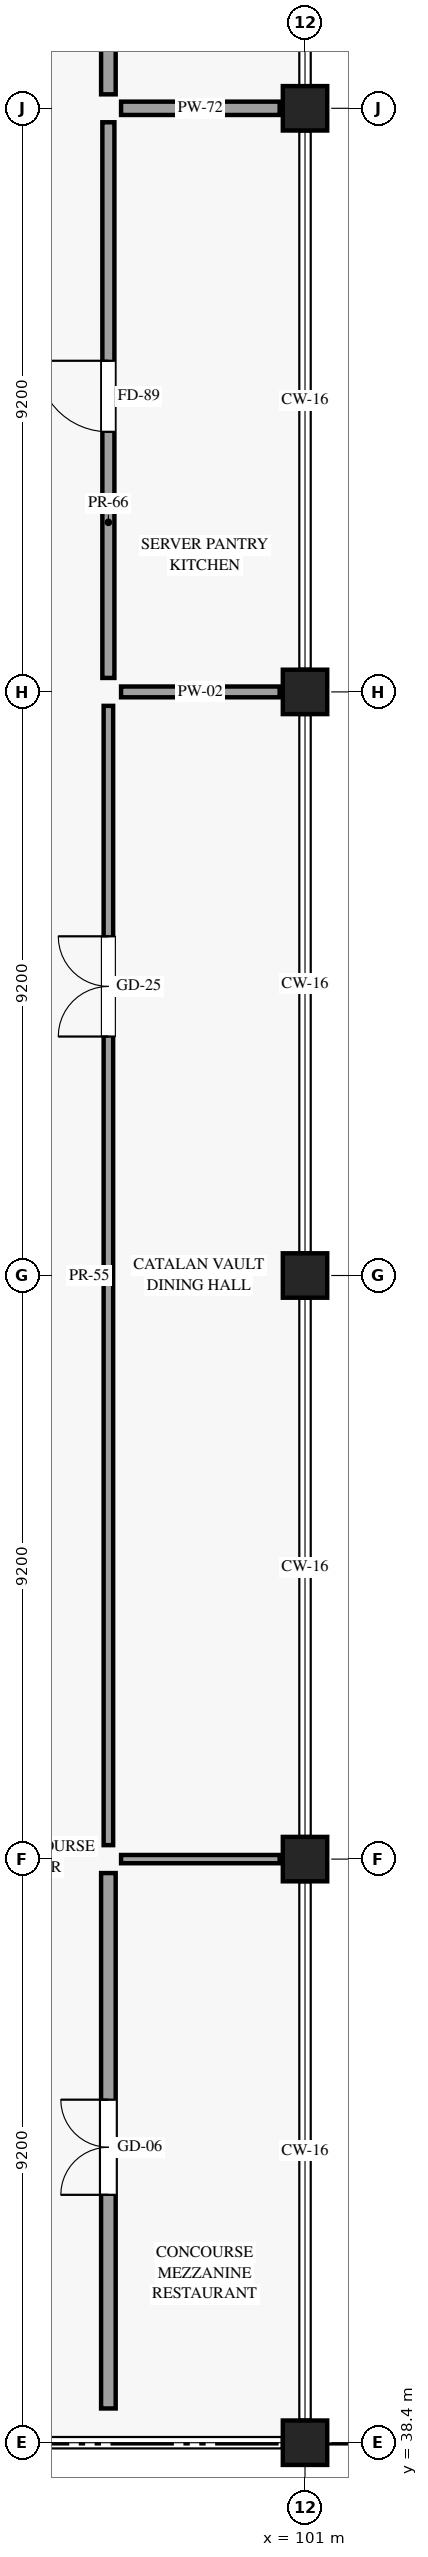
"""IFC4 building model, lengths in metres.
Left out: names, types, materials, properties, quantities, classifications, styles, units other than length and angle.
Written with IfcOpenShell. Run it as: python <this file> out.ifc"""

import sys

from ifc_helpers import new_model, si_unit, direction, frame, frame_2d, origin, origin_2d, place, context, subcontext, project, spatial, rectangle, extrude, element, fill, save


model = new_model("IFC4")
c1 = context("Model", 3, precision=1e-05, world=origin(), true_north=direction((0.0, 1.0)))
c2 = subcontext(c1, "Body", "Model", "MODEL_VIEW")
j1 = project(units=[si_unit("LENGTHUNIT", "METRE"), si_unit("PLANEANGLEUNIT", "RADIAN")], contexts=[c1])
p1 = place(None, origin())
s1 = spatial("IfcSite", under=j1, at=p1, CompositionType="ELEMENT")
p2 = place(p1, origin())
s2 = spatial("IfcBuilding", under=s1, at=p2, CompositionType="ELEMENT")
p3 = place(p2, frame((0.0, 0.0, 5.4)))
s3 = spatial("IfcBuildingStorey", under=s2, at=p3, CompositionType="ELEMENT", Elevation=5.4)
for number, where, z_axis, x_axis in (
    (1, (101.0, 38.4, 0.0), (0.0, 0.0, 1.0), (1.0, 0.0, 0.0)),
    (2, (101.0, 47.6, 0.0), (0.0, 0.0, 1.0), (1.0, 0.0, 0.0)),
    (3, (101.0, 56.8, 0.0), (0.0, 0.0, 1.0), (1.0, 0.0, 0.0)),
    (4, (101.0, 66.0, 0.0), (0.0, 0.0, 1.0), (1.0, 0.0, 0.0)),
    (5, (101.0, 75.2, 0.0), (0.0, 0.0, 1.0), (1.0, 0.0, 0.0)),
):
    element("IfcColumn", number, at=place(p3, frame(where, z_axis=z_axis, x_axis=x_axis)), inside=s3, PredefinedType="COLUMN", context=c2, shape_type="SweptSolid", body=[
        extrude(rectangle(XDim=0.7, YDim=0.7, at=origin_2d()), origin(), (0.0, 0.0, 1.0), 4.8),
    ])
p4 = place(p3, frame((97.9, 38.94, 0.0), z_axis=(0.0, 0.0, 1.0), x_axis=(0.0, 1.0, 0.0)))
e6 = element("IfcWall", 6, at=p4, inside=s3, PredefinedType="PARTITIONING", context=c2, shape_type="SweptSolid", body=[
    extrude(rectangle(XDim=8.44, YDim=0.23, at=frame_2d((4.22, 0.0))), origin(), (0.0, 0.0, 1.0), 3.675),
])
p5 = place(p4, frame((3.368, 0.0, 0.0)))
e7 = element("IfcOpeningElement", 7, at=p5, cuts=e6, PredefinedType="OPENING", context=c2, shape_type="SweptSolid", body=[
    extrude(rectangle(XDim=1.5, YDim=2.35, at=frame_2d((0.75, 1.175))), frame((0.0, 0.125, 0.0), z_axis=(0.0, -1.0, 0.0), x_axis=(1.0, 0.0, 0.0)), (0.0, 0.0, 1.0), 0.25),
])
p6 = place(p3, frame((98.1, 47.6, 0.0), z_axis=(0.0, 0.0, 1.0), x_axis=(1.0, 0.0, 0.0)))
e8 = element("IfcWall", 8, at=p6, inside=s3, PredefinedType="PARTITIONING", context=c2, shape_type="SweptSolid", body=[
    extrude(rectangle(XDim=2.5, YDim=0.13, at=frame_2d((1.25, 0.0))), origin(), (0.0, 0.0, 1.0), 3.675),
])
p7 = place(p3, frame((97.9, 47.82, 0.0), z_axis=(0.0, 0.0, 1.0), x_axis=(0.0, 1.0, 0.0)))
e9 = element("IfcWall", 9, at=p7, inside=s3, PredefinedType="PARTITIONING", context=c2, shape_type="SweptSolid", body=[
    extrude(rectangle(XDim=17.96, YDim=0.15, at=frame_2d((8.98, 0.0))), origin(), (0.0, 0.0, 1.0), 3.675),
])
p8 = place(p7, frame((12.747, 0.0, 0.0)))
e10 = element("IfcOpeningElement", 10, at=p8, cuts=e9, PredefinedType="OPENING", context=c2, shape_type="SweptSolid", body=[
    extrude(rectangle(XDim=1.58, YDim=2.38, at=frame_2d((0.79, 1.19))), frame((0.0, 0.085, 0.0), z_axis=(0.0, -1.0, 0.0), x_axis=(1.0, 0.0, 0.0)), (0.0, 0.0, 1.0), 0.17),
])
p9 = place(p3, frame((98.1, 66.0, 0.0), z_axis=(0.0, 0.0, 1.0), x_axis=(1.0, 0.0, 0.0)))
e11 = element("IfcWall", 11, at=p9, inside=s3, PredefinedType="PARTITIONING", context=c2, shape_type="SweptSolid", body=[
    extrude(rectangle(XDim=2.5, YDim=0.17, at=frame_2d((1.25, 0.0))), origin(), (0.0, 0.0, 1.0), 3.675),
])
p10 = place(p3, frame((97.9, 66.22, 0.0), z_axis=(0.0, 0.0, 1.0), x_axis=(0.0, 1.0, 0.0)))
e12 = element("IfcWall", 12, at=p10, inside=s3, PredefinedType="PARTITIONING", context=c2, shape_type="SweptSolid", body=[
    extrude(rectangle(XDim=8.76, YDim=0.19, at=frame_2d((4.38, 0.0))), origin(), (0.0, 0.0, 1.0), 3.675),
])
p11 = place(p10, frame((3.88, 0.0, 0.0)))
e13 = element("IfcOpeningElement", 13, at=p11, cuts=e12, PredefinedType="OPENING", context=c2, shape_type="SweptSolid", body=[
    extrude(rectangle(XDim=1.12, YDim=2.26, at=frame_2d((0.56, 1.13))), frame((0.0, 0.105, 0.0), z_axis=(0.0, -1.0, 0.0), x_axis=(1.0, 0.0, 0.0)), (0.0, 0.0, 1.0), 0.21),
])
p12 = place(p3, frame((98.1, 75.2, 0.0), z_axis=(0.0, 0.0, 1.0), x_axis=(1.0, 0.0, 0.0)))
e14 = element("IfcWall", 14, at=p12, inside=s3, PredefinedType="PARTITIONING", context=c2, shape_type="SweptSolid", body=[
    extrude(rectangle(XDim=2.5, YDim=0.21, at=frame_2d((1.25, 0.0))), origin(), (0.0, 0.0, 1.0), 3.675),
])
p13 = place(p3, frame((97.9, 75.42, 0.0), z_axis=(0.0, 0.0, 1.0), x_axis=(0.0, 1.0, 0.0)))
e15 = element("IfcWall", 15, at=p13, inside=s3, PredefinedType="PARTITIONING", context=c2, shape_type="SweptSolid", body=[
    extrude(rectangle(XDim=17.96, YDim=0.23, at=frame_2d((8.98, 0.0))), origin(), (0.0, 0.0, 1.0), 3.675),
])
p14 = place(p13, frame((3.936, 0.0, 0.0)))
e16 = element("IfcOpeningElement", 16, at=p14, cuts=e15, PredefinedType="OPENING", context=c2, shape_type="SweptSolid", body=[
    extrude(rectangle(XDim=1.2, YDim=2.3, at=frame_2d((0.6, 1.15))), frame((0.0, 0.125, 0.0), z_axis=(0.0, -1.0, 0.0), x_axis=(1.0, 0.0, 0.0)), (0.0, 0.0, 1.0), 0.25),
])
p15 = place(p5, origin())
e17 = element("IfcDoor", 17, at=p15, inside=s3, OperationType="DOUBLE_DOOR_SINGLE_SWING", PredefinedType="DOOR", context=c2, shape_type="SweptSolid", body=[
    extrude(rectangle(XDim=1.5, YDim=2.35, at=frame_2d((0.75, 1.175))), frame((0.0, 0.025, 0.0), z_axis=(0.0, -1.0, 0.0), x_axis=(1.0, 0.0, 0.0)), (0.0, 0.0, 1.0), 0.05),
])
fill(e7, e17)
p16 = place(p8, origin())
e18 = element("IfcDoor", 18, at=p16, inside=s3, OperationType="DOUBLE_DOOR_SINGLE_SWING", PredefinedType="DOOR", context=c2, shape_type="SweptSolid", body=[
    extrude(rectangle(XDim=1.58, YDim=2.38, at=frame_2d((0.79, 1.19))), frame((0.0, 0.025, 0.0), z_axis=(0.0, -1.0, 0.0), x_axis=(1.0, 0.0, 0.0)), (0.0, 0.0, 1.0), 0.05),
])
fill(e10, e18)
p17 = place(p11, origin())
e19 = element("IfcDoor", 19, at=p17, inside=s3, OperationType="SINGLE_SWING_RIGHT", PredefinedType="DOOR", context=c2, shape_type="SweptSolid", body=[
    extrude(rectangle(XDim=1.12, YDim=2.26, at=frame_2d((0.56, 1.13))), frame((0.0, 0.025, 0.0), z_axis=(0.0, -1.0, 0.0), x_axis=(1.0, 0.0, 0.0)), (0.0, 0.0, 1.0), 0.05),
])
fill(e13, e19)
save(model, sys.argv[1])
